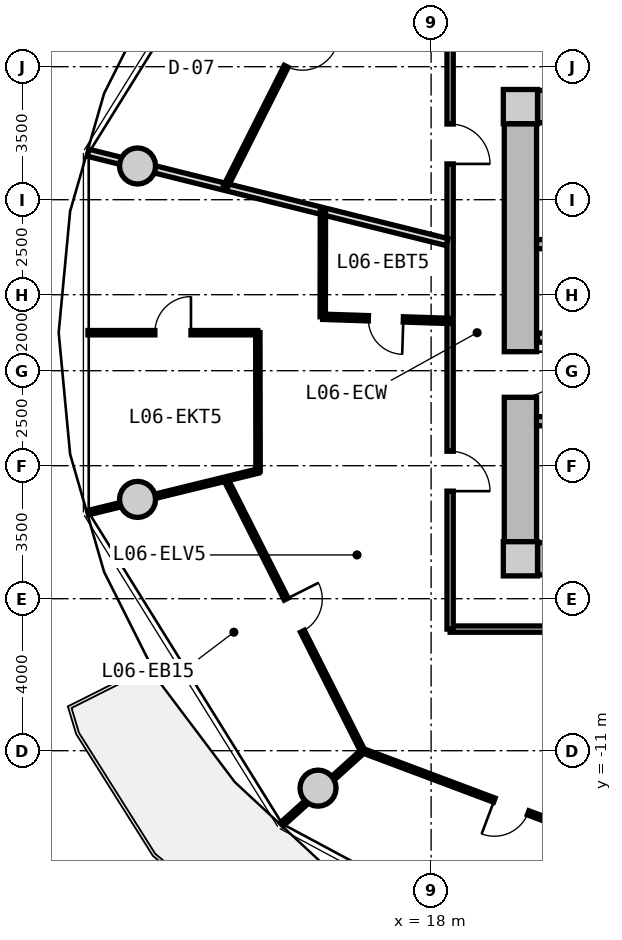
"""IFC4 building model, lengths in metres.
Left out: names, types, materials, properties, quantities, classifications, styles, units other than length and angle.
Written with IfcOpenShell. Run it as: python <this file> out.ifc"""

import sys

from ifc_helpers import new_model, si_unit, direction, frame, frame_2d, origin, origin_2d, place, context, subcontext, project, spatial, rectangle, circle, extrude, source, transform, mapped, element, fill, save


model = new_model("IFC4")
c1 = context("Model", 3, precision=1e-05, world=origin(), true_north=direction((0.0, 1.0)))
c2 = subcontext(c1, "Body", "Model", "MODEL_VIEW")
j1 = project(units=[si_unit("LENGTHUNIT", "METRE"), si_unit("PLANEANGLEUNIT", "RADIAN")], contexts=[c1])
p1 = place(None, origin())
s1 = spatial("IfcSite", under=j1, at=p1, CompositionType="ELEMENT")
p2 = place(p1, origin())
s2 = spatial("IfcBuilding", under=s1, at=p2, CompositionType="ELEMENT")
p3 = place(p2, frame((0.0, 0.0, 24.65)))
s3 = spatial("IfcBuildingStorey", under=s2, at=p3, CompositionType="ELEMENT", Elevation=24.65)
m1 = source(origin(), c2, "Body", "SweptSolid", [
    extrude(rectangle(XDim=0.9, YDim=0.9, at=origin_2d()), origin(), (0.0, 0.0, 1.0), 3.05),
])
for number, where, z_axis, x_axis in (
    (1, (20.35, -5.95, 0.0), (0.0, 0.0, 1.0), (1.0, 0.0, 0.0)),
    (2, (20.35, 5.95, 0.0), (0.0, 0.0, 1.0), (1.0, 0.0, 0.0)),
):
    element("IfcColumn", number, at=place(p3, frame(where, z_axis=z_axis, x_axis=x_axis)), inside=s3, PredefinedType="COLUMN", context=c2, shape_type="MappedRepresentation", body=[
        mapped(m1, transform((0.0, 0.0, 0.0), x_axis=(1.0, 0.0, 0.0), y_axis=(0.0, 1.0, 0.0), z_axis=(0.0, 0.0, 1.0), scale=1.0)),
    ])
m2 = source(origin(), c2, "Body", "SweptSolid", [
    extrude(rectangle(XDim=14.4, YDim=0.85, at=frame_2d((7.2, 0.0))), origin(), (0.0, 0.0, 1.0), 2.79),
])
for number, where, z_axis, x_axis in (
    (3, (20.8, 5.95, 0.0), (0.0, 0.0, 1.0), (1.0, 0.0, 0.0)),
    (4, (35.2, -5.95, 0.0), (0.0, 0.0, 1.0), (-1.0, 0.0, 0.0)),
):
    element("IfcWall", number, at=place(p3, frame(where, z_axis=z_axis, x_axis=x_axis)), inside=s3, PredefinedType="SHEAR", context=c2, shape_type="MappedRepresentation", body=[
        mapped(m2, transform((0.0, 0.0, 0.0), x_axis=(1.0, 0.0, 0.0), y_axis=(0.0, 1.0, 0.0), z_axis=(0.0, 0.0, 1.0), scale=1.0)),
    ])
m3 = source(origin(), c2, "Body", "SweptSolid", [
    extrude(rectangle(XDim=11.0, YDim=0.85, at=frame_2d((5.5, 0.0))), origin(), (0.0, 0.0, 1.0), 2.79),
])
p4 = place(p3, frame((20.35, -5.5, 0.0), z_axis=(0.0, 0.0, 1.0), x_axis=(0.0, 1.0, 0.0)))
e5 = element("IfcWall", 5, at=p4, inside=s3, PredefinedType="SHEAR", context=c2, shape_type="MappedRepresentation", body=[
    mapped(m3, transform((0.0, 0.0, 0.0), x_axis=(1.0, 0.0, 0.0), y_axis=(0.0, 1.0, 0.0), z_axis=(0.0, 0.0, 1.0), scale=1.0)),
])
p5 = place(p4, frame((3.8, 0.0, 0.0)))
e6 = element("IfcOpeningElement", 6, at=p5, cuts=e5, PredefinedType="OPENING", context=c2, shape_type="SweptSolid", body=[
    extrude(rectangle(XDim=1.2, YDim=2.15, at=frame_2d((0.6, 1.075))), frame((0.0, 0.435, 0.0), z_axis=(0.0, -1.0, 0.0), x_axis=(1.0, 0.0, 0.0)), (0.0, 0.0, 1.0), 0.87),
])
m4 = source(origin(), c2, "Body", "SweptSolid", [
    extrude(circle(Radius=0.475, at=origin_2d()), origin(), (0.0, 0.0, 1.0), 3.05),
])
for number, where, z_axis, x_axis in (
    (7, (10.275, 4.387, 0.0), (0.0, 0.0, 1.0), (1.0, 0.0, 0.0)),
    (8, (10.275, -4.387, 0.0), (0.0, 0.0, 1.0), (1.0, 0.0, 0.0)),
    (9, (15.025, -11.985, 0.0), (0.0, 0.0, 1.0), (1.0, 0.0, 0.0)),
):
    element("IfcColumn", number, at=place(p3, frame(where, z_axis=z_axis, x_axis=x_axis)), inside=s3, PredefinedType="COLUMN", context=c2, shape_type="MappedRepresentation", body=[
        mapped(m4, transform((0.0, 0.0, 0.0), x_axis=(1.0, 0.0, 0.0), y_axis=(0.0, 1.0, 0.0), z_axis=(0.0, 0.0, 1.0), scale=1.0)),
    ])
m5 = source(origin(), c2, "Body", "SweptSolid", [
    extrude(rectangle(XDim=7.765, YDim=0.24, at=frame_2d((3.883, 0.0))), origin(), (0.0, 0.0, 1.0), 2.79),
])
p6 = place(p3, frame((20.775, 2.33, 0.0), z_axis=(0.0, 0.0, 1.0), x_axis=(1.0, 0.0, 0.0)))
e10 = element("IfcWall", 10, at=p6, inside=s3, PredefinedType="PARTITIONING", context=c2, shape_type="MappedRepresentation", body=[
    mapped(m5, transform((0.0, 0.0, 0.0), x_axis=(1.0, 0.0, 0.0), y_axis=(0.0, 1.0, 0.0), z_axis=(0.0, 0.0, 1.0), scale=1.0)),
])
p7 = place(p3, frame((20.775, -2.33, 0.0), z_axis=(0.0, 0.0, 1.0), x_axis=(1.0, 0.0, 0.0)))
e11 = element("IfcWall", 11, at=p7, inside=s3, PredefinedType="PARTITIONING", context=c2, shape_type="MappedRepresentation", body=[
    mapped(m5, transform((0.0, 0.0, 0.0), x_axis=(1.0, 0.0, 0.0), y_axis=(0.0, 1.0, 0.0), z_axis=(0.0, 0.0, 1.0), scale=1.0)),
])
p8 = place(p7, frame((0.885, 0.0, 0.0)))
e12 = element("IfcOpeningElement", 12, at=p8, cuts=e11, PredefinedType="OPENING", context=c2, shape_type="SweptSolid", body=[
    extrude(rectangle(XDim=1.1, YDim=2.15, at=frame_2d((0.55, 1.075))), frame((0.0, 0.13, 0.0), z_axis=(0.0, -1.0, 0.0), x_axis=(1.0, 0.0, 0.0)), (0.0, 0.0, 1.0), 0.26),
])
m6 = source(origin(), c2, "Body", "SweptSolid", [
    extrude(rectangle(XDim=7.62, YDim=0.24, at=frame_2d((3.81, 0.0))), origin(), (0.0, 0.0, 1.0), 2.775),
])
p9 = place(p3, frame((20.8, -0.13, 0.0), z_axis=(0.0, 0.0, 1.0), x_axis=(1.0, 0.0, 0.0)))
e13 = element("IfcWall", 13, at=p9, inside=s3, PredefinedType="PARTITIONING", context=c2, shape_type="MappedRepresentation", body=[
    mapped(m6, transform((0.0, 0.0, 0.0), x_axis=(1.0, 0.0, 0.0), y_axis=(0.0, 1.0, 0.0), z_axis=(0.0, 0.0, 1.0), scale=1.0)),
])
p10 = place(p9, frame((6.22, 0.0, 0.0)))
e14 = element("IfcOpeningElement", 14, at=p10, cuts=e13, PredefinedType="OPENING", context=c2, shape_type="SweptSolid", body=[
    extrude(rectangle(XDim=1.0, YDim=2.1, at=frame_2d((0.5, 1.05))), frame((0.0, 0.13, 0.0), z_axis=(0.0, -1.0, 0.0), x_axis=(1.0, 0.0, 0.0)), (0.0, 0.0, 1.0), 0.26),
])
p11 = place(p9, frame((0.85, 0.0, 0.0)))
e15 = element("IfcOpeningElement", 15, at=p11, cuts=e13, PredefinedType="OPENING", context=c2, shape_type="SweptSolid", body=[
    extrude(rectangle(XDim=1.1, YDim=2.2, at=frame_2d((0.55, 1.1))), frame((0.0, 0.13, 0.0), z_axis=(0.0, -1.0, 0.0), x_axis=(1.0, 0.0, 0.0)), (0.0, 0.0, 1.0), 0.26),
])
p12 = place(p9, frame((3.85, 0.0, 0.0)))
e16 = element("IfcOpeningElement", 16, at=p12, cuts=e13, PredefinedType="OPENING", context=c2, shape_type="SweptSolid", body=[
    extrude(rectangle(XDim=1.1, YDim=2.2, at=frame_2d((0.55, 1.1))), frame((0.0, 0.13, 0.0), z_axis=(0.0, -1.0, 0.0), x_axis=(1.0, 0.0, 0.0)), (0.0, 0.0, 1.0), 0.26),
])
m7 = source(origin(), c2, "Body", "SweptSolid", [
    extrude(rectangle(XDim=19.0, YDim=0.165, at=frame_2d((9.5, 0.0))), origin(), (0.0, 0.0, 1.0), 2.775),
])
p13 = place(p3, frame((37.5, -7.8, 0.0), z_axis=(0.0, 0.0, 1.0), x_axis=(-1.0, 0.0, 0.0)))
e17 = element("IfcWall", 17, at=p13, inside=s3, PredefinedType="PARTITIONING", context=c2, shape_type="MappedRepresentation", body=[
    mapped(m7, transform((0.0, 0.0, 0.0), x_axis=(1.0, 0.0, 0.0), y_axis=(0.0, 1.0, 0.0), z_axis=(0.0, 0.0, 1.0), scale=1.0)),
])
p14 = place(p13, frame((8.875, 0.0, 0.0)))
e18 = element("IfcOpeningElement", 18, at=p14, cuts=e17, PredefinedType="OPENING", context=c2, shape_type="SweptSolid", body=[
    extrude(rectangle(XDim=1.25, YDim=2.2, at=frame_2d((0.625, 1.1))), frame((0.0, 0.093, 0.0), z_axis=(0.0, -1.0, 0.0), x_axis=(1.0, 0.0, 0.0)), (0.0, 0.0, 1.0), 0.185),
])
p15 = place(p13, frame((5.915, 0.0, 0.0)))
e19 = element("IfcOpeningElement", 19, at=p15, cuts=e17, PredefinedType="OPENING", context=c2, shape_type="SweptSolid", body=[
    extrude(rectangle(XDim=0.92, YDim=2.1, at=frame_2d((0.46, 1.05))), frame((0.0, 0.093, 0.0), z_axis=(0.0, -1.0, 0.0), x_axis=(1.0, 0.0, 0.0)), (0.0, 0.0, 1.0), 0.185),
])
p16 = place(p13, frame((2.769, 0.0, 0.0)))
e20 = element("IfcOpeningElement", 20, at=p16, cuts=e17, PredefinedType="OPENING", context=c2, shape_type="SweptSolid", body=[
    extrude(rectangle(XDim=0.92, YDim=2.1, at=frame_2d((0.46, 1.05))), frame((0.0, 0.093, 0.0), z_axis=(0.0, -1.0, 0.0), x_axis=(1.0, 0.0, 0.0)), (0.0, 0.0, 1.0), 0.185),
])
m8 = source(origin(), c2, "Body", "SweptSolid", [
    extrude(rectangle(XDim=15.6, YDim=0.165, at=frame_2d((7.8, 0.0))), origin(), (0.0, 0.0, 1.0), 2.775),
])
p17 = place(p3, frame((18.5, -7.8, 0.0), z_axis=(0.0, 0.0, 1.0), x_axis=(0.0, 1.0, 0.0)))
e21 = element("IfcWall", 21, at=p17, inside=s3, PredefinedType="PARTITIONING", context=c2, shape_type="MappedRepresentation", body=[
    mapped(m8, transform((0.0, 0.0, 0.0), x_axis=(1.0, 0.0, 0.0), y_axis=(0.0, 1.0, 0.0), z_axis=(0.0, 0.0, 1.0), scale=1.0)),
])
p18 = place(p17, frame((12.241, 0.0, 0.0)))
e22 = element("IfcOpeningElement", 22, at=p18, cuts=e21, PredefinedType="OPENING", context=c2, shape_type="SweptSolid", body=[
    extrude(rectangle(XDim=1.05, YDim=2.15, at=frame_2d((0.525, 1.075))), frame((0.0, 0.093, 0.0), z_axis=(0.0, -1.0, 0.0), x_axis=(1.0, 0.0, 0.0)), (0.0, 0.0, 1.0), 0.185),
])
p19 = place(p17, frame((3.63, 0.0, 0.0)))
e23 = element("IfcOpeningElement", 23, at=p19, cuts=e21, PredefinedType="OPENING", context=c2, shape_type="SweptSolid", body=[
    extrude(rectangle(XDim=1.05, YDim=2.15, at=frame_2d((0.525, 1.075))), frame((0.0, 0.093, 0.0), z_axis=(0.0, -1.0, 0.0), x_axis=(1.0, 0.0, 0.0)), (0.0, 0.0, 1.0), 0.185),
])
m9 = source(origin(), c2, "Body", "SweptSolid", [
    extrude(rectangle(XDim=9.737, YDim=0.19, at=frame_2d((4.869, 0.0))), origin(), (0.0, 0.0, 1.0), 2.225),
])
p20 = place(p3, frame((18.42, 2.385, 0.0), z_axis=(0.0, 0.0, 1.0), x_axis=(-0.970392716238, 0.241532557375, 0.0)))
e24 = element("IfcWall", 24, at=p20, inside=s3, PredefinedType="PARTITIONING", context=c2, shape_type="MappedRepresentation", body=[
    mapped(m9, transform((0.0, 0.0, 0.0), x_axis=(1.0, 0.0, 0.0), y_axis=(0.0, 1.0, 0.0), z_axis=(0.0, 0.0, 1.0), scale=1.0)),
])
m10 = source(origin(), c2, "Body", "SweptSolid", [
    extrude(rectangle(XDim=8.018, YDim=0.115, at=frame_2d((4.009, 0.0))), origin(), (0.0, 0.0, 1.0), 2.775),
])
p21 = place(p3, frame((16.205, 11.014, 0.0), z_axis=(0.0, 0.0, 1.0), x_axis=(-0.450134355233, -0.89296084026, 0.0)))
e25 = element("IfcWall", 25, at=p21, inside=s3, PredefinedType="PARTITIONING", context=c2, shape_type="MappedRepresentation", body=[
    mapped(m10, transform((0.0, 0.0, 0.0), x_axis=(1.0, 0.0, 0.0), y_axis=(0.0, 1.0, 0.0), z_axis=(0.0, 0.0, 1.0), scale=1.0)),
])
p22 = place(p21, frame((3.534, 0.0, 0.0)))
e26 = element("IfcOpeningElement", 26, at=p22, cuts=e25, PredefinedType="OPENING", context=c2, shape_type="SweptSolid", body=[
    extrude(rectangle(XDim=0.95, YDim=2.1, at=frame_2d((0.475, 1.05))), frame((0.0, 0.067, 0.0), z_axis=(0.0, -1.0, 0.0), x_axis=(1.0, 0.0, 0.0)), (0.0, 0.0, 1.0), 0.135),
])
p23 = place(p3, frame((12.596, -3.854, 0.0), z_axis=(0.0, 0.0, 1.0), x_axis=(0.450134355233, -0.89296084026, 0.0)))
e27 = element("IfcWall", 27, at=p23, inside=s3, PredefinedType="PARTITIONING", context=c2, shape_type="MappedRepresentation", body=[
    mapped(m10, transform((0.0, 0.0, 0.0), x_axis=(1.0, 0.0, 0.0), y_axis=(0.0, 1.0, 0.0), z_axis=(0.0, 0.0, 1.0), scale=1.0)),
])
p24 = place(p23, frame((3.534, 0.0, 0.0)))
e28 = element("IfcOpeningElement", 28, at=p24, cuts=e27, PredefinedType="OPENING", context=c2, shape_type="SweptSolid", body=[
    extrude(rectangle(XDim=0.95, YDim=2.1, at=frame_2d((0.475, 1.05))), frame((0.0, 0.067, 0.0), z_axis=(0.0, -1.0, 0.0), x_axis=(1.0, 0.0, 0.0)), (0.0, 0.0, 1.0), 0.135),
])
m11 = source(origin(), c2, "Body", "SweptSolid", [
    extrude(rectangle(XDim=4.609, YDim=0.115, at=frame_2d((2.305, 0.0))), origin(), (0.0, 0.0, 1.0), 2.225),
])
p25 = place(p3, frame((13.448, -3.641, 0.0), z_axis=(0.0, 0.0, 1.0), x_axis=(-0.971345494518, -0.237671896276, 0.0)))
e29 = element("IfcWall", 29, at=p25, inside=s3, PredefinedType="PARTITIONING", context=c2, shape_type="MappedRepresentation", body=[
    mapped(m11, transform((0.0, 0.0, 0.0), x_axis=(1.0, 0.0, 0.0), y_axis=(0.0, 1.0, 0.0), z_axis=(0.0, 0.0, 1.0), scale=1.0)),
])
m12 = source(origin(), c2, "Body", "SweptSolid", [
    extrude(rectangle(XDim=8.32, YDim=0.115, at=frame_2d((4.16, 0.0))), origin(), (0.0, 0.0, 1.0), 2.775),
])
p26 = place(p3, frame((16.214, -11.006, 0.0), z_axis=(0.0, 0.0, 1.0), x_axis=(0.936180763098, -0.351518959382, 0.0)))
e30 = element("IfcWall", 30, at=p26, inside=s3, PredefinedType="PARTITIONING", context=c2, shape_type="MappedRepresentation", body=[
    mapped(m12, transform((0.0, 0.0, 0.0), x_axis=(1.0, 0.0, 0.0), y_axis=(0.0, 1.0, 0.0), z_axis=(0.0, 0.0, 1.0), scale=1.0)),
])
p27 = place(p26, frame((3.685, 0.0, 0.0)))
e31 = element("IfcOpeningElement", 31, at=p27, cuts=e30, PredefinedType="OPENING", context=c2, shape_type="SweptSolid", body=[
    extrude(rectangle(XDim=0.95, YDim=2.1, at=frame_2d((0.475, 1.05))), frame((0.0, 0.067, 0.0), z_axis=(0.0, -1.0, 0.0), x_axis=(1.0, 0.0, 0.0)), (0.0, 0.0, 1.0), 0.135),
])
m13 = source(origin(), c2, "Body", "SweptSolid", [
    extrude(rectangle(XDim=2.887, YDim=0.115, at=frame_2d((1.444, 0.0))), origin(), (0.0, 0.0, 1.0), 2.225),
])
p28 = place(p3, frame((16.214, -11.006, 0.0), z_axis=(0.0, 0.0, 1.0), x_axis=(-0.742448503307, -0.669903142205, 0.0)))
e32 = element("IfcWall", 32, at=p28, inside=s3, PredefinedType="PARTITIONING", context=c2, shape_type="MappedRepresentation", body=[
    mapped(m13, transform((0.0, 0.0, 0.0), x_axis=(1.0, 0.0, 0.0), y_axis=(0.0, 1.0, 0.0), z_axis=(0.0, 0.0, 1.0), scale=1.0)),
])
m14 = source(origin(), c2, "Body", "SweptSolid", [
    extrude(rectangle(XDim=3.323, YDim=0.14, at=frame_2d((1.662, 0.0))), origin(), (0.0, 0.0, 1.0), 2.775),
])
p29 = place(p3, frame((18.47, 0.311, 0.0), z_axis=(0.0, 0.0, 1.0), x_axis=(-0.999467979553, 0.032615300817, 0.0)))
e33 = element("IfcWall", 33, at=p29, inside=s3, PredefinedType="PARTITIONING", context=c2, shape_type="MappedRepresentation", body=[
    mapped(m14, transform((0.0, 0.0, 0.0), x_axis=(1.0, 0.0, 0.0), y_axis=(0.0, 1.0, 0.0), z_axis=(0.0, 0.0, 1.0), scale=1.0)),
])
p30 = place(p29, frame((1.202, 0.0, 0.0)))
e34 = element("IfcOpeningElement", 34, at=p30, cuts=e33, PredefinedType="OPENING", context=c2, shape_type="SweptSolid", body=[
    extrude(rectangle(XDim=0.92, YDim=2.1, at=frame_2d((0.46, 1.05))), frame((0.0, 0.08, 0.0), z_axis=(0.0, -1.0, 0.0), x_axis=(1.0, 0.0, 0.0)), (0.0, 0.0, 1.0), 0.16),
])
m15 = source(origin(), c2, "Body", "SweptSolid", [
    extrude(rectangle(XDim=2.795, YDim=0.14, at=frame_2d((1.397, 0.0))), origin(), (0.0, 0.0, 1.0), 2.775),
])
p31 = place(p3, frame((15.148, 0.419, 0.0), z_axis=(0.0, 0.0, 1.0), x_axis=(0.001659531299, 0.999998622977, 0.0)))
e35 = element("IfcWall", 35, at=p31, inside=s3, PredefinedType="PARTITIONING", context=c2, shape_type="MappedRepresentation", body=[
    mapped(m15, transform((0.0, 0.0, 0.0), x_axis=(1.0, 0.0, 0.0), y_axis=(0.0, 1.0, 0.0), z_axis=(0.0, 0.0, 1.0), scale=1.0)),
])
m16 = source(origin(), c2, "Body", "SweptSolid", [
    extrude(rectangle(XDim=4.469, YDim=0.115, at=frame_2d((2.234, 0.0))), origin(), (0.0, 0.0, 1.0), 2.775),
])
p32 = place(p3, frame((13.44, 0.0, 0.0), z_axis=(0.0, 0.0, 1.0), x_axis=(-1.0, 0.0, 0.0)))
e36 = element("IfcWall", 36, at=p32, inside=s3, PredefinedType="PARTITIONING", context=c2, shape_type="MappedRepresentation", body=[
    mapped(m16, transform((0.0, 0.0, 0.0), x_axis=(1.0, 0.0, 0.0), y_axis=(0.0, 1.0, 0.0), z_axis=(0.0, 0.0, 1.0), scale=1.0)),
])
p33 = place(p32, frame((1.759, 0.0, 0.0)))
e37 = element("IfcOpeningElement", 37, at=p33, cuts=e36, PredefinedType="OPENING", context=c2, shape_type="SweptSolid", body=[
    extrude(rectangle(XDim=0.95, YDim=2.1, at=frame_2d((0.475, 1.05))), frame((0.0, 0.067, 0.0), z_axis=(0.0, -1.0, 0.0), x_axis=(1.0, 0.0, 0.0)), (0.0, 0.0, 1.0), 0.135),
])
m17 = source(origin(), c2, "Body", "SweptSolid", [
    extrude(rectangle(XDim=3.641, YDim=0.115, at=frame_2d((1.821, 0.0))), origin(), (0.0, 0.0, 1.0), 2.775),
])
p34 = place(p3, frame((13.44, 0.0, 0.0), z_axis=(0.0, 0.0, 1.0), x_axis=(0.001877301419, -0.999998237868, 0.0)))
e38 = element("IfcWall", 38, at=p34, inside=s3, PredefinedType="PARTITIONING", context=c2, shape_type="MappedRepresentation", body=[
    mapped(m17, transform((0.0, 0.0, 0.0), x_axis=(1.0, 0.0, 0.0), y_axis=(0.0, 1.0, 0.0), z_axis=(0.0, 0.0, 1.0), scale=1.0)),
])
m18 = source(origin(), c2, "Body", "SweptSolid", [
    extrude(rectangle(XDim=1.2, YDim=2.15, at=frame_2d((0.6, 1.075))), frame((0.0, 0.025, 0.0), z_axis=(0.0, -1.0, 0.0), x_axis=(1.0, 0.0, 0.0)), (0.0, 0.0, 1.0), 0.05),
])
p35 = place(p5, frame((1.2, 0.0, 0.0), z_axis=(0.0, 0.0, 1.0), x_axis=(-1.0, 0.0, 0.0)))
e39 = element("IfcDoor", 39, at=p35, inside=s3, OperationType="SINGLE_SWING_LEFT", PredefinedType="DOOR", context=c2, shape_type="MappedRepresentation", body=[
    mapped(m18, transform((0.0, 0.0, 0.0), x_axis=(1.0, 0.0, 0.0), y_axis=(0.0, 1.0, 0.0), z_axis=(0.0, 0.0, 1.0), scale=1.0)),
])
fill(e6, e39)
m19 = source(origin(), c2, "Body", "SweptSolid", [
    extrude(rectangle(XDim=1.05, YDim=2.15, at=frame_2d((0.525, 1.075))), frame((0.0, 0.025, 0.0), z_axis=(0.0, -1.0, 0.0), x_axis=(1.0, 0.0, 0.0)), (0.0, 0.0, 1.0), 0.05),
])
p36 = place(p18, frame((1.05, 0.0, 0.0), z_axis=(0.0, 0.0, 1.0), x_axis=(-1.0, 0.0, 0.0)))
e40 = element("IfcDoor", 40, at=p36, inside=s3, OperationType="SINGLE_SWING_RIGHT", PredefinedType="DOOR", context=c2, shape_type="MappedRepresentation", body=[
    mapped(m19, transform((0.0, 0.0, 0.0), x_axis=(1.0, 0.0, 0.0), y_axis=(0.0, 1.0, 0.0), z_axis=(0.0, 0.0, 1.0), scale=1.0)),
])
fill(e22, e40)
m20 = source(origin(), c2, "Body", "SweptSolid", [
    extrude(rectangle(XDim=0.95, YDim=2.1, at=frame_2d((0.475, 1.05))), frame((0.0, 0.025, 0.0), z_axis=(0.0, -1.0, 0.0), x_axis=(1.0, 0.0, 0.0)), (0.0, 0.0, 1.0), 0.05),
])
p37 = place(p22, origin())
e41 = element("IfcDoor", 41, at=p37, inside=s3, OperationType="SINGLE_SWING_LEFT", PredefinedType="DOOR", context=c2, shape_type="MappedRepresentation", body=[
    mapped(m20, transform((0.0, 0.0, 0.0), x_axis=(1.0, 0.0, 0.0), y_axis=(0.0, 1.0, 0.0), z_axis=(0.0, 0.0, 1.0), scale=1.0)),
])
fill(e26, e41)
p38 = place(p19, frame((1.05, 0.0, 0.0), z_axis=(0.0, 0.0, 1.0), x_axis=(-1.0, 0.0, 0.0)))
e42 = element("IfcDoor", 42, at=p38, inside=s3, OperationType="SINGLE_SWING_RIGHT", PredefinedType="DOOR", context=c2, shape_type="MappedRepresentation", body=[
    mapped(m19, transform((0.0, 0.0, 0.0), x_axis=(1.0, 0.0, 0.0), y_axis=(0.0, 1.0, 0.0), z_axis=(0.0, 0.0, 1.0), scale=1.0)),
])
fill(e23, e42)
m21 = source(origin(), c2, "Body", "SweptSolid", [
    extrude(rectangle(XDim=0.92, YDim=2.1, at=frame_2d((0.46, 1.05))), frame((0.0, 0.025, 0.0), z_axis=(0.0, -1.0, 0.0), x_axis=(1.0, 0.0, 0.0)), (0.0, 0.0, 1.0), 0.05),
])
p39 = place(p30, origin())
e43 = element("IfcDoor", 43, at=p39, inside=s3, OperationType="SINGLE_SWING_LEFT", PredefinedType="DOOR", context=c2, shape_type="MappedRepresentation", body=[
    mapped(m21, transform((0.0, 0.0, 0.0), x_axis=(1.0, 0.0, 0.0), y_axis=(0.0, 1.0, 0.0), z_axis=(0.0, 0.0, 1.0), scale=1.0)),
])
fill(e34, e43)
p40 = place(p33, frame((0.95, 0.0, 0.0), z_axis=(0.0, 0.0, 1.0), x_axis=(-1.0, 0.0, 0.0)))
e44 = element("IfcDoor", 44, at=p40, inside=s3, OperationType="SINGLE_SWING_RIGHT", PredefinedType="DOOR", context=c2, shape_type="MappedRepresentation", body=[
    mapped(m20, transform((0.0, 0.0, 0.0), x_axis=(1.0, 0.0, 0.0), y_axis=(0.0, 1.0, 0.0), z_axis=(0.0, 0.0, 1.0), scale=1.0)),
])
fill(e37, e44)
p41 = place(p24, origin())
e45 = element("IfcDoor", 45, at=p41, inside=s3, OperationType="SINGLE_SWING_LEFT", PredefinedType="DOOR", context=c2, shape_type="MappedRepresentation", body=[
    mapped(m20, transform((0.0, 0.0, 0.0), x_axis=(1.0, 0.0, 0.0), y_axis=(0.0, 1.0, 0.0), z_axis=(0.0, 0.0, 1.0), scale=1.0)),
])
fill(e28, e45)
p42 = place(p27, frame((0.95, 0.0, 0.0), z_axis=(0.0, 0.0, 1.0), x_axis=(-1.0, 0.0, 0.0)))
e46 = element("IfcDoor", 46, at=p42, inside=s3, OperationType="SINGLE_SWING_RIGHT", PredefinedType="DOOR", context=c2, shape_type="MappedRepresentation", body=[
    mapped(m20, transform((0.0, 0.0, 0.0), x_axis=(1.0, 0.0, 0.0), y_axis=(0.0, 1.0, 0.0), z_axis=(0.0, 0.0, 1.0), scale=1.0)),
])
fill(e31, e46)
save(model, sys.argv[1])
